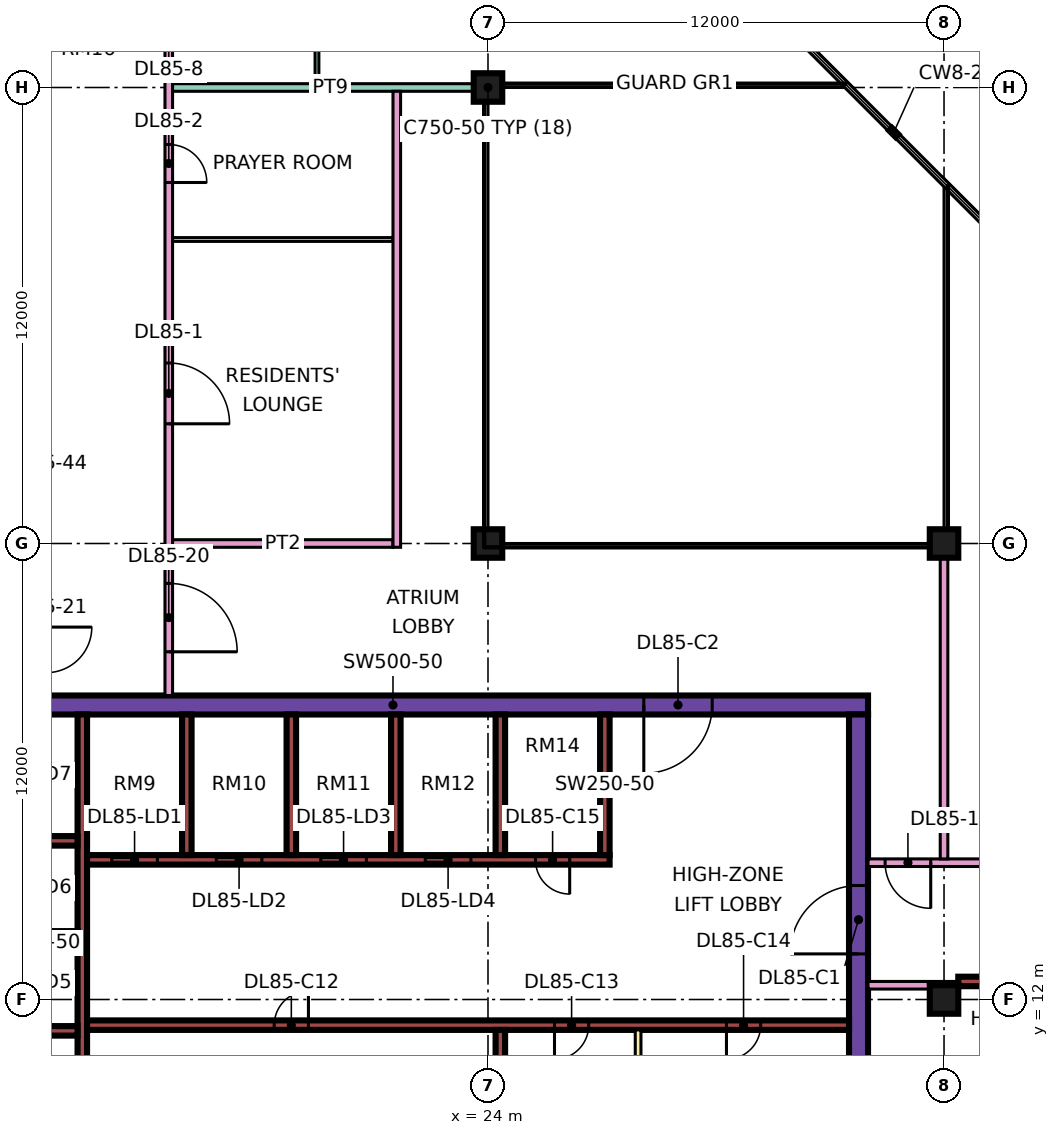
"""IFC4 building model, lengths in metres.
Left out: names, types, materials, properties, quantities, classifications, styles, units other than length and angle.
Written with IfcOpenShell. Run it as: python <this file> out.ifc"""

import sys

from ifc_helpers import new_model, si_unit, direction, frame, frame_2d, origin, origin_2d, place, context, subcontext, project, spatial, rectangle, extrude, element, fill, save


model = new_model("IFC4")
c1 = context("Model", 3, precision=1e-05, world=origin(), true_north=direction((0.0, 1.0)))
c2 = subcontext(c1, "Body", "Model", "MODEL_VIEW")
j1 = project(units=[si_unit("LENGTHUNIT", "METRE"), si_unit("PLANEANGLEUNIT", "RADIAN")], contexts=[c1])
p1 = place(None, origin())
s1 = spatial("IfcSite", under=j1, at=p1, CompositionType="ELEMENT")
p2 = place(p1, origin())
s2 = spatial("IfcBuilding", under=s1, at=p2, CompositionType="ELEMENT")
p3 = place(p2, frame((0.0, 0.0, 365.15)))
s3 = spatial("IfcBuildingStorey", under=s2, at=p3, CompositionType="ELEMENT", Elevation=365.15)
for number, where, z_axis, x_axis in (
    (1, (24.0, 24.0, 0.0), (0.0, 0.0, 1.0), (1.0, 0.0, 0.0)),
    (2, (24.0, 36.0, 0.0), (0.0, 0.0, 1.0), (1.0, 0.0, 0.0)),
    (3, (36.0, 12.0, 0.0), (0.0, 0.0, 1.0), (1.0, 0.0, 0.0)),
    (4, (36.0, 24.0, 0.0), (0.0, 0.0, 1.0), (1.0, 0.0, 0.0)),
):
    element("IfcColumn", number, at=place(p3, frame(where, z_axis=z_axis, x_axis=x_axis)), inside=s3, PredefinedType="COLUMN", context=c2, shape_type="SweptSolid", body=[
        extrude(rectangle(XDim=0.75, YDim=0.75, at=origin_2d()), origin(), (0.0, 0.0, 1.0), 3.75),
    ])
p4 = place(p3, frame((9.0, 19.75, 0.0), z_axis=(0.0, 0.0, 1.0), x_axis=(1.0, 0.0, 0.0)))
e5 = element("IfcWall", 5, at=p4, inside=s3, PredefinedType="SHEAR", context=c2, shape_type="SweptSolid", body=[
    extrude(rectangle(XDim=25.0, YDim=0.5, at=frame_2d((12.5, 0.0))), origin(), (0.0, 0.0, 1.0), 3.75),
])
p5 = place(p4, frame((19.1, 0.0, 0.0)))
e6 = element("IfcOpeningElement", 6, at=p5, cuts=e5, PredefinedType="OPENING", context=c2, shape_type="SweptSolid", body=[
    extrude(rectangle(XDim=1.8, YDim=2.4, at=frame_2d((0.9, 1.2))), frame((0.0, 0.26, 0.0), z_axis=(0.0, -1.0, 0.0), x_axis=(1.0, 0.0, 0.0)), (0.0, 0.0, 1.0), 0.52),
])
p6 = place(p3, frame((33.75, 7.5, 0.0), z_axis=(0.0, 0.0, 1.0), x_axis=(0.0, 1.0, 0.0)))
e7 = element("IfcWall", 7, at=p6, inside=s3, PredefinedType="SHEAR", context=c2, shape_type="SweptSolid", body=[
    extrude(rectangle(XDim=12.0, YDim=0.5, at=frame_2d((6.0, 0.0))), origin(), (0.0, 0.0, 1.0), 3.75),
])
p7 = place(p6, frame((5.7, 0.0, 0.0)))
e8 = element("IfcOpeningElement", 8, at=p7, cuts=e7, PredefinedType="OPENING", context=c2, shape_type="SweptSolid", body=[
    extrude(rectangle(XDim=1.8, YDim=2.4, at=frame_2d((0.9, 1.2))), frame((0.0, 0.26, 0.0), z_axis=(0.0, -1.0, 0.0), x_axis=(1.0, 0.0, 0.0)), (0.0, 0.0, 1.0), 0.52),
])
p8 = place(p3, frame((13.325, 7.5, 0.0), z_axis=(0.0, 0.0, 1.0), x_axis=(0.0, 1.0, 0.0)))
e9 = element("IfcWall", 9, at=p8, inside=s3, PredefinedType="SHEAR", context=c2, shape_type="SweptSolid", body=[
    extrude(rectangle(XDim=12.0, YDim=0.25, at=frame_2d((6.0, 0.0))), origin(), (0.0, 0.0, 1.0), 3.75),
])
p9 = place(p3, frame((13.45, 11.325, 0.0), z_axis=(0.0, 0.0, 1.0), x_axis=(1.0, 0.0, 0.0)))
e10 = element("IfcWall", 10, at=p9, inside=s3, PredefinedType="SHEAR", context=c2, shape_type="SweptSolid", body=[
    extrude(rectangle(XDim=20.05, YDim=0.25, at=frame_2d((10.025, 0.0))), origin(), (0.0, 0.0, 1.0), 3.75),
])
p10 = place(p9, frame((4.925, 0.0, 0.0)))
e11 = element("IfcOpeningElement", 11, at=p10, cuts=e10, PredefinedType="OPENING", context=c2, shape_type="SweptSolid", body=[
    extrude(rectangle(XDim=0.9, YDim=2.1, at=frame_2d((0.45, 1.05))), frame((0.0, 0.135, 0.0), z_axis=(0.0, -1.0, 0.0), x_axis=(1.0, 0.0, 0.0)), (0.0, 0.0, 1.0), 0.27),
])
p11 = place(p9, frame((12.3, 0.0, 0.0)))
e12 = element("IfcOpeningElement", 12, at=p11, cuts=e10, PredefinedType="OPENING", context=c2, shape_type="SweptSolid", body=[
    extrude(rectangle(XDim=0.9, YDim=2.1, at=frame_2d((0.45, 1.05))), frame((0.0, 0.135, 0.0), z_axis=(0.0, -1.0, 0.0), x_axis=(1.0, 0.0, 0.0)), (0.0, 0.0, 1.0), 0.27),
])
p12 = place(p9, frame((16.825, 0.0, 0.0)))
e13 = element("IfcOpeningElement", 13, at=p12, cuts=e10, PredefinedType="OPENING", context=c2, shape_type="SweptSolid", body=[
    extrude(rectangle(XDim=0.9, YDim=2.1, at=frame_2d((0.45, 1.05))), frame((0.0, 0.135, 0.0), z_axis=(0.0, -1.0, 0.0), x_axis=(1.0, 0.0, 0.0)), (0.0, 0.0, 1.0), 0.27),
])
p13 = place(p3, frame((13.45, 15.675, 0.0), z_axis=(0.0, 0.0, 1.0), x_axis=(1.0, 0.0, 0.0)))
e14 = element("IfcWall", 14, at=p13, inside=s3, PredefinedType="SHEAR", context=c2, shape_type="SweptSolid", body=[
    extrude(rectangle(XDim=13.75, YDim=0.25, at=frame_2d((6.875, 0.0))), origin(), (0.0, 0.0, 1.0), 3.75),
])
p14 = place(p13, frame((0.65, 0.0, 0.0)))
e15 = element("IfcOpeningElement", 15, at=p14, cuts=e14, PredefinedType="OPENING", context=c2, shape_type="SweptSolid", body=[
    extrude(rectangle(XDim=1.2, YDim=2.2, at=frame_2d((0.6, 1.1))), frame((0.0, 0.135, 0.0), z_axis=(0.0, -1.0, 0.0), x_axis=(1.0, 0.0, 0.0)), (0.0, 0.0, 1.0), 0.27),
])
p15 = place(p13, frame((3.4, 0.0, 0.0)))
e16 = element("IfcOpeningElement", 16, at=p15, cuts=e14, PredefinedType="OPENING", context=c2, shape_type="SweptSolid", body=[
    extrude(rectangle(XDim=1.2, YDim=2.2, at=frame_2d((0.6, 1.1))), frame((0.0, 0.135, 0.0), z_axis=(0.0, -1.0, 0.0), x_axis=(1.0, 0.0, 0.0)), (0.0, 0.0, 1.0), 0.27),
])
p16 = place(p13, frame((6.15, 0.0, 0.0)))
e17 = element("IfcOpeningElement", 17, at=p16, cuts=e14, PredefinedType="OPENING", context=c2, shape_type="SweptSolid", body=[
    extrude(rectangle(XDim=1.2, YDim=2.2, at=frame_2d((0.6, 1.1))), frame((0.0, 0.135, 0.0), z_axis=(0.0, -1.0, 0.0), x_axis=(1.0, 0.0, 0.0)), (0.0, 0.0, 1.0), 0.27),
])
p17 = place(p13, frame((8.9, 0.0, 0.0)))
e18 = element("IfcOpeningElement", 18, at=p17, cuts=e14, PredefinedType="OPENING", context=c2, shape_type="SweptSolid", body=[
    extrude(rectangle(XDim=1.2, YDim=2.2, at=frame_2d((0.6, 1.1))), frame((0.0, 0.135, 0.0), z_axis=(0.0, -1.0, 0.0), x_axis=(1.0, 0.0, 0.0)), (0.0, 0.0, 1.0), 0.27),
])
p18 = place(p13, frame((11.8, 0.0, 0.0)))
e19 = element("IfcOpeningElement", 19, at=p18, cuts=e14, PredefinedType="OPENING", context=c2, shape_type="SweptSolid", body=[
    extrude(rectangle(XDim=0.9, YDim=2.1, at=frame_2d((0.45, 1.05))), frame((0.0, 0.135, 0.0), z_axis=(0.0, -1.0, 0.0), x_axis=(1.0, 0.0, 0.0)), (0.0, 0.0, 1.0), 0.27),
])
for number, where, z_axis, x_axis in (
    (20, (10.2, 11.175, 0.0), (0.0, 0.0, 1.0), (1.0, 0.0, 0.0)),
    (21, (10.2, 13.675, 0.0), (0.0, 0.0, 1.0), (1.0, 0.0, 0.0)),
    (22, (10.2, 16.175, 0.0), (0.0, 0.0, 1.0), (1.0, 0.0, 0.0)),
):
    element("IfcWall", number, at=place(p3, frame(where, z_axis=z_axis, x_axis=x_axis)), inside=s3, PredefinedType="SHEAR", context=c2, shape_type="SweptSolid", body=[
        extrude(rectangle(XDim=3.0, YDim=0.25, at=frame_2d((1.5, 0.0))), origin(), (0.0, 0.0, 1.0), 3.75),
    ])
for number, where, z_axis, x_axis in (
    (23, (24.325, 7.5, 0.0), (0.0, 0.0, 1.0), (0.0, 1.0, 0.0)),
    (24, (16.075, 15.8, 0.0), (0.0, 0.0, 1.0), (0.0, 1.0, 0.0)),
    (25, (18.825, 15.8, 0.0), (0.0, 0.0, 1.0), (0.0, 1.0, 0.0)),
    (26, (21.575, 15.8, 0.0), (0.0, 0.0, 1.0), (0.0, 1.0, 0.0)),
    (27, (24.325, 15.8, 0.0), (0.0, 0.0, 1.0), (0.0, 1.0, 0.0)),
    (28, (27.075, 15.8, 0.0), (0.0, 0.0, 1.0), (0.0, 1.0, 0.0)),
):
    element("IfcWall", number, at=place(p3, frame(where, z_axis=z_axis, x_axis=x_axis)), inside=s3, PredefinedType="SHEAR", context=c2, shape_type="SweptSolid", body=[
        extrude(rectangle(XDim=3.7, YDim=0.25, at=frame_2d((1.85, 0.0))), origin(), (0.0, 0.0, 1.0), 3.75),
    ])
p19 = place(p3, frame((36.375, 12.475, 0.0), z_axis=(0.0, 0.0, 1.0), x_axis=(1.0, 0.0, 0.0)))
e29 = element("IfcWall", 29, at=p19, inside=s3, PredefinedType="SHEAR", context=c2, shape_type="SweptSolid", body=[
    extrude(rectangle(XDim=4.275, YDim=0.25, at=frame_2d((2.137, 0.0))), origin(), (0.0, 0.0, 1.0), 3.75),
])
p20 = place(p19, frame((2.0, 0.0, 0.0)))
e30 = element("IfcOpeningElement", 30, at=p20, cuts=e29, PredefinedType="OPENING", context=c2, shape_type="SweptSolid", body=[
    extrude(rectangle(XDim=1.1, YDim=2.2, at=frame_2d((0.55, 1.1))), frame((0.0, 0.135, 0.0), z_axis=(0.0, -1.0, 0.0), x_axis=(1.0, 0.0, 0.0)), (0.0, 0.0, 1.0), 0.27),
])
p21 = place(p3, frame((-1.447, 12.553, 0.0), z_axis=(0.0, 0.0, 1.0), x_axis=(0.707106781187, -0.707106781187, 0.0)))
e31 = element("IfcWall", 31, at=p21, inside=s3, PredefinedType="SOLIDWALL", context=c2, shape_type="SweptSolid", body=[
    extrude(rectangle(XDim=19.799, YDim=0.15, at=frame_2d((9.899, 0.0))), origin(), (0.0, 0.0, 1.0), 3.35),
])
p22 = place(p21, frame((2.212, 0.0, 0.45)))
e32 = element("IfcOpeningElement", 32, at=p22, cuts=e31, PredefinedType="OPENING", context=c2, shape_type="SweptSolid", body=[
    extrude(rectangle(XDim=3.0, YDim=2.4, at=frame_2d((1.5, 1.2))), frame((0.0, 0.085, 0.0), z_axis=(0.0, -1.0, 0.0), x_axis=(1.0, 0.0, 0.0)), (0.0, 0.0, 1.0), 0.17),
])
p23 = place(p21, frame((10.216, 0.0, 0.45)))
e33 = element("IfcOpeningElement", 33, at=p23, cuts=e31, PredefinedType="OPENING", context=c2, shape_type="SweptSolid", body=[
    extrude(rectangle(XDim=3.0, YDim=2.4, at=frame_2d((1.5, 1.2))), frame((0.0, 0.085, 0.0), z_axis=(0.0, -1.0, 0.0), x_axis=(1.0, 0.0, 0.0)), (0.0, 0.0, 1.0), 0.17),
])
p24 = place(p3, frame((27.95, 7.5, 0.0), z_axis=(0.0, 0.0, 1.0), x_axis=(0.0, 1.0, 0.0)))
e34 = element("IfcWall", 34, at=p24, inside=s3, PredefinedType="PARTITIONING", context=c2, shape_type="SweptSolid", body=[
    extrude(rectangle(XDim=3.7, YDim=0.15, at=frame_2d((1.85, 0.0))), origin(), (0.0, 0.0, 1.0), 3.35),
])
p25 = place(p3, frame((15.6, 20.0, 0.0), z_axis=(0.0, 0.0, 1.0), x_axis=(0.0, 1.0, 0.0)))
e35 = element("IfcWall", 35, at=p25, inside=s3, PredefinedType="PARTITIONING", context=c2, shape_type="SweptSolid", body=[
    extrude(rectangle(XDim=27.775, YDim=0.2, at=frame_2d((13.887, 0.0))), origin(), (0.0, 0.0, 1.0), 3.35),
])
p26 = place(p25, frame((7.15, 0.0, 0.0)))
e36 = element("IfcOpeningElement", 36, at=p26, cuts=e35, PredefinedType="OPENING", context=c2, shape_type="SweptSolid", body=[
    extrude(rectangle(XDim=1.6, YDim=2.1, at=frame_2d((0.8, 1.05))), frame((0.0, 0.11, 0.0), z_axis=(0.0, -1.0, 0.0), x_axis=(1.0, 0.0, 0.0)), (0.0, 0.0, 1.0), 0.22),
])
p27 = place(p25, frame((13.5, 0.0, 0.0)))
e37 = element("IfcOpeningElement", 37, at=p27, cuts=e35, PredefinedType="OPENING", context=c2, shape_type="SweptSolid", body=[
    extrude(rectangle(XDim=1.0, YDim=2.1, at=frame_2d((0.5, 1.05))), frame((0.0, 0.11, 0.0), z_axis=(0.0, -1.0, 0.0), x_axis=(1.0, 0.0, 0.0)), (0.0, 0.0, 1.0), 0.22),
])
p28 = place(p25, frame((17.05, 0.0, 0.0)))
e38 = element("IfcOpeningElement", 38, at=p28, cuts=e35, PredefinedType="OPENING", context=c2, shape_type="SweptSolid", body=[
    extrude(rectangle(XDim=1.0, YDim=2.1, at=frame_2d((0.5, 1.05))), frame((0.0, 0.11, 0.0), z_axis=(0.0, -1.0, 0.0), x_axis=(1.0, 0.0, 0.0)), (0.0, 0.0, 1.0), 0.22),
])
p29 = place(p25, frame((1.15, 0.0, 0.0)))
e39 = element("IfcOpeningElement", 39, at=p29, cuts=e35, PredefinedType="OPENING", context=c2, shape_type="SweptSolid", body=[
    extrude(rectangle(XDim=1.8, YDim=2.1, at=frame_2d((0.9, 1.05))), frame((0.0, 0.11, 0.0), z_axis=(0.0, -1.0, 0.0), x_axis=(1.0, 0.0, 0.0)), (0.0, 0.0, 1.0), 0.22),
])
p30 = place(p25, frame((25.9, 0.0, 0.0)))
e40 = element("IfcOpeningElement", 40, at=p30, cuts=e35, PredefinedType="OPENING", context=c2, shape_type="SweptSolid", body=[
    extrude(rectangle(XDim=1.0, YDim=2.1, at=frame_2d((0.5, 1.05))), frame((0.0, 0.11, 0.0), z_axis=(0.0, -1.0, 0.0), x_axis=(1.0, 0.0, 0.0)), (0.0, 0.0, 1.0), 0.22),
])
p31 = place(p3, frame((15.7, 24.0, 0.0), z_axis=(0.0, 0.0, 1.0), x_axis=(1.0, 0.0, 0.0)))
e41 = element("IfcWall", 41, at=p31, inside=s3, PredefinedType="PARTITIONING", context=c2, shape_type="SweptSolid", body=[
    extrude(rectangle(XDim=5.8, YDim=0.2, at=frame_2d((2.9, 0.0))), origin(), (0.0, 0.0, 1.0), 3.35),
])
p32 = place(p3, frame((15.7, 32.0, 0.0), z_axis=(0.0, 0.0, 1.0), x_axis=(1.0, 0.0, 0.0)))
e42 = element("IfcWall", 42, at=p32, inside=s3, PredefinedType="PARTITIONING", context=c2, shape_type="SweptSolid", body=[
    extrude(rectangle(XDim=5.8, YDim=0.1, at=frame_2d((2.9, 0.0))), origin(), (0.0, 0.0, 1.0), 3.35),
])
p33 = place(p3, frame((15.7, 36.0, 0.0), z_axis=(0.0, 0.0, 1.0), x_axis=(1.0, 0.0, 0.0)))
e43 = element("IfcWall", 43, at=p33, inside=s3, PredefinedType="PARTITIONING", context=c2, shape_type="SweptSolid", body=[
    extrude(rectangle(XDim=8.3, YDim=0.2, at=frame_2d((4.15, 0.0))), origin(), (0.0, 0.0, 1.0), 3.35),
])
p34 = place(p3, frame((19.5, 36.1, 0.0), z_axis=(0.0, 0.0, 1.0), x_axis=(0.0, 1.0, 0.0)))
e44 = element("IfcWall", 44, at=p34, inside=s3, PredefinedType="PARTITIONING", context=c2, shape_type="SweptSolid", body=[
    extrude(rectangle(XDim=2.85, YDim=0.1, at=frame_2d((1.425, 0.0))), origin(), (0.0, 0.0, 1.0), 3.35),
])
p35 = place(p34, frame((0.95, 0.0, 0.0)))
e45 = element("IfcOpeningElement", 45, at=p35, cuts=e44, PredefinedType="OPENING", context=c2, shape_type="SweptSolid", body=[
    extrude(rectangle(XDim=0.9, YDim=2.1, at=frame_2d((0.45, 1.05))), frame((0.0, 0.06, 0.0), z_axis=(0.0, -1.0, 0.0), x_axis=(1.0, 0.0, 0.0)), (0.0, 0.0, 1.0), 0.12),
])
p36 = place(p3, frame((21.6, 23.9, 0.0), z_axis=(0.0, 0.0, 1.0), x_axis=(0.0, 1.0, 0.0)))
e46 = element("IfcWall", 46, at=p36, inside=s3, PredefinedType="PARTITIONING", context=c2, shape_type="SweptSolid", body=[
    extrude(rectangle(XDim=12.0, YDim=0.2, at=frame_2d((6.0, 0.0))), origin(), (0.0, 0.0, 1.0), 3.35),
])
p37 = place(p3, frame((34.0, 12.375, 0.0), z_axis=(0.0, 0.0, 1.0), x_axis=(1.0, 0.0, 0.0)))
e47 = element("IfcWall", 47, at=p37, inside=s3, PredefinedType="PARTITIONING", context=c2, shape_type="SweptSolid", body=[
    extrude(rectangle(XDim=2.376, YDim=0.2, at=frame_2d((1.188, 0.0))), origin(), (0.0, 0.0, 1.0), 3.35),
])
p38 = place(p3, frame((34.0, 15.6, 0.0), z_axis=(0.0, 0.0, 1.0), x_axis=(1.0, 0.0, 0.0)))
e48 = element("IfcWall", 48, at=p38, inside=s3, PredefinedType="PARTITIONING", context=c2, shape_type="SweptSolid", body=[
    extrude(rectangle(XDim=10.35, YDim=0.2, at=frame_2d((5.175, 0.0))), origin(), (0.0, 0.0, 1.0), 3.35),
])
p39 = place(p38, frame((5.6, 0.0, 0.0)))
e49 = element("IfcOpeningElement", 49, at=p39, cuts=e48, PredefinedType="OPENING", context=c2, shape_type="SweptSolid", body=[
    extrude(rectangle(XDim=1.0, YDim=2.1, at=frame_2d((0.5, 1.05))), frame((0.0, 0.11, 0.0), z_axis=(0.0, -1.0, 0.0), x_axis=(1.0, 0.0, 0.0)), (0.0, 0.0, 1.0), 0.22),
])
p40 = place(p38, frame((0.45, 0.0, 0.0)))
e50 = element("IfcOpeningElement", 50, at=p40, cuts=e48, PredefinedType="OPENING", context=c2, shape_type="SweptSolid", body=[
    extrude(rectangle(XDim=1.2, YDim=2.1, at=frame_2d((0.6, 1.05))), frame((0.0, 0.11, 0.0), z_axis=(0.0, -1.0, 0.0), x_axis=(1.0, 0.0, 0.0)), (0.0, 0.0, 1.0), 0.22),
])
p41 = place(p3, frame((36.0, 15.7, 0.0), z_axis=(0.0, 0.0, 1.0), x_axis=(0.0, 1.0, 0.0)))
e51 = element("IfcWall", 51, at=p41, inside=s3, PredefinedType="PARTITIONING", context=c2, shape_type="SweptSolid", body=[
    extrude(rectangle(XDim=8.3, YDim=0.2, at=frame_2d((4.15, 0.0))), origin(), (0.0, 0.0, 1.0), 3.35),
])
p42 = place(p14, origin())
e52 = element("IfcDoor", 52, at=p42, inside=s3, OperationType="DOUBLE_DOOR_SLIDING", PredefinedType="DOOR", context=c2, shape_type="SweptSolid", body=[
    extrude(rectangle(XDim=1.2, YDim=2.2, at=frame_2d((0.6, 1.1))), frame((0.0, 0.025, 0.0), z_axis=(0.0, -1.0, 0.0), x_axis=(1.0, 0.0, 0.0)), (0.0, 0.0, 1.0), 0.05),
])
fill(e15, e52)
p43 = place(p15, origin())
e53 = element("IfcDoor", 53, at=p43, inside=s3, OperationType="DOUBLE_DOOR_SLIDING", PredefinedType="DOOR", context=c2, shape_type="SweptSolid", body=[
    extrude(rectangle(XDim=1.2, YDim=2.2, at=frame_2d((0.6, 1.1))), frame((0.0, 0.025, 0.0), z_axis=(0.0, -1.0, 0.0), x_axis=(1.0, 0.0, 0.0)), (0.0, 0.0, 1.0), 0.05),
])
fill(e16, e53)
p44 = place(p16, origin())
e54 = element("IfcDoor", 54, at=p44, inside=s3, OperationType="DOUBLE_DOOR_SLIDING", PredefinedType="DOOR", context=c2, shape_type="SweptSolid", body=[
    extrude(rectangle(XDim=1.2, YDim=2.2, at=frame_2d((0.6, 1.1))), frame((0.0, 0.025, 0.0), z_axis=(0.0, -1.0, 0.0), x_axis=(1.0, 0.0, 0.0)), (0.0, 0.0, 1.0), 0.05),
])
fill(e17, e54)
p45 = place(p17, origin())
e55 = element("IfcDoor", 55, at=p45, inside=s3, OperationType="DOUBLE_DOOR_SLIDING", PredefinedType="DOOR", context=c2, shape_type="SweptSolid", body=[
    extrude(rectangle(XDim=1.2, YDim=2.2, at=frame_2d((0.6, 1.1))), frame((0.0, 0.025, 0.0), z_axis=(0.0, -1.0, 0.0), x_axis=(1.0, 0.0, 0.0)), (0.0, 0.0, 1.0), 0.05),
])
fill(e18, e55)
p46 = place(p7, origin())
e56 = element("IfcDoor", 56, at=p46, inside=s3, OperationType="DOUBLE_DOOR_SINGLE_SWING", PredefinedType="DOOR", context=c2, shape_type="SweptSolid", body=[
    extrude(rectangle(XDim=1.8, YDim=2.4, at=frame_2d((0.9, 1.2))), frame((0.0, 0.025, 0.0), z_axis=(0.0, -1.0, 0.0), x_axis=(1.0, 0.0, 0.0)), (0.0, 0.0, 1.0), 0.05),
])
fill(e8, e56)
p47 = place(p5, frame((1.8, 0.0, 0.0), z_axis=(0.0, 0.0, 1.0), x_axis=(-1.0, 0.0, 0.0)))
e57 = element("IfcDoor", 57, at=p47, inside=s3, OperationType="DOUBLE_DOOR_SINGLE_SWING", PredefinedType="DOOR", context=c2, shape_type="SweptSolid", body=[
    extrude(rectangle(XDim=1.8, YDim=2.4, at=frame_2d((0.9, 1.2))), frame((0.0, 0.025, 0.0), z_axis=(0.0, -1.0, 0.0), x_axis=(1.0, 0.0, 0.0)), (0.0, 0.0, 1.0), 0.05),
])
fill(e6, e57)
p48 = place(p10, frame((0.9, 0.0, 0.0), z_axis=(0.0, 0.0, 1.0), x_axis=(-1.0, 0.0, 0.0)))
e58 = element("IfcDoor", 58, at=p48, inside=s3, OperationType="SINGLE_SWING_RIGHT", PredefinedType="DOOR", context=c2, shape_type="SweptSolid", body=[
    extrude(rectangle(XDim=0.9, YDim=2.1, at=frame_2d((0.45, 1.05))), frame((0.0, 0.025, 0.0), z_axis=(0.0, -1.0, 0.0), x_axis=(1.0, 0.0, 0.0)), (0.0, 0.0, 1.0), 0.05),
])
fill(e11, e58)
p49 = place(p11, frame((0.9, 0.0, 0.0), z_axis=(0.0, 0.0, 1.0), x_axis=(-1.0, 0.0, 0.0)))
e59 = element("IfcDoor", 59, at=p49, inside=s3, OperationType="SINGLE_SWING_LEFT", PredefinedType="DOOR", context=c2, shape_type="SweptSolid", body=[
    extrude(rectangle(XDim=0.9, YDim=2.1, at=frame_2d((0.45, 1.05))), frame((0.0, 0.025, 0.0), z_axis=(0.0, -1.0, 0.0), x_axis=(1.0, 0.0, 0.0)), (0.0, 0.0, 1.0), 0.05),
])
fill(e12, e59)
p50 = place(p12, frame((0.9, 0.0, 0.0), z_axis=(0.0, 0.0, 1.0), x_axis=(-1.0, 0.0, 0.0)))
e60 = element("IfcDoor", 60, at=p50, inside=s3, OperationType="SINGLE_SWING_LEFT", PredefinedType="DOOR", context=c2, shape_type="SweptSolid", body=[
    extrude(rectangle(XDim=0.9, YDim=2.1, at=frame_2d((0.45, 1.05))), frame((0.0, 0.025, 0.0), z_axis=(0.0, -1.0, 0.0), x_axis=(1.0, 0.0, 0.0)), (0.0, 0.0, 1.0), 0.05),
])
fill(e13, e60)
p51 = place(p18, origin())
e61 = element("IfcDoor", 61, at=p51, inside=s3, OperationType="SINGLE_SWING_RIGHT", PredefinedType="DOOR", context=c2, shape_type="SweptSolid", body=[
    extrude(rectangle(XDim=0.9, YDim=2.1, at=frame_2d((0.45, 1.05))), frame((0.0, 0.025, 0.0), z_axis=(0.0, -1.0, 0.0), x_axis=(1.0, 0.0, 0.0)), (0.0, 0.0, 1.0), 0.05),
])
fill(e19, e61)
p52 = place(p26, frame((1.6, 0.0, 0.0), z_axis=(0.0, 0.0, 1.0), x_axis=(-1.0, 0.0, 0.0)))
e62 = element("IfcDoor", 62, at=p52, inside=s3, OperationType="DOUBLE_DOOR_SINGLE_SWING", PredefinedType="DOOR", context=c2, shape_type="SweptSolid", body=[
    extrude(rectangle(XDim=1.6, YDim=2.1, at=frame_2d((0.8, 1.05))), frame((0.0, 0.025, 0.0), z_axis=(0.0, -1.0, 0.0), x_axis=(1.0, 0.0, 0.0)), (0.0, 0.0, 1.0), 0.05),
])
fill(e36, e62)
p53 = place(p27, frame((1.0, 0.0, 0.0), z_axis=(0.0, 0.0, 1.0), x_axis=(-1.0, 0.0, 0.0)))
e63 = element("IfcDoor", 63, at=p53, inside=s3, OperationType="SINGLE_SWING_LEFT", PredefinedType="DOOR", context=c2, shape_type="SweptSolid", body=[
    extrude(rectangle(XDim=1.0, YDim=2.1, at=frame_2d((0.5, 1.05))), frame((0.0, 0.025, 0.0), z_axis=(0.0, -1.0, 0.0), x_axis=(1.0, 0.0, 0.0)), (0.0, 0.0, 1.0), 0.05),
])
fill(e37, e63)
p54 = place(p40, origin())
e64 = element("IfcDoor", 64, at=p54, inside=s3, OperationType="SINGLE_SWING_RIGHT", PredefinedType="DOOR", context=c2, shape_type="SweptSolid", body=[
    extrude(rectangle(XDim=1.2, YDim=2.1, at=frame_2d((0.6, 1.05))), frame((0.0, 0.025, 0.0), z_axis=(0.0, -1.0, 0.0), x_axis=(1.0, 0.0, 0.0)), (0.0, 0.0, 1.0), 0.05),
])
fill(e50, e64)
p55 = place(p29, frame((1.8, 0.0, 0.0), z_axis=(0.0, 0.0, 1.0), x_axis=(-1.0, 0.0, 0.0)))
e65 = element("IfcDoor", 65, at=p55, inside=s3, OperationType="DOUBLE_DOOR_SINGLE_SWING", PredefinedType="DOOR", context=c2, shape_type="SweptSolid", body=[
    extrude(rectangle(XDim=1.8, YDim=2.1, at=frame_2d((0.9, 1.05))), frame((0.0, 0.025, 0.0), z_axis=(0.0, -1.0, 0.0), x_axis=(1.0, 0.0, 0.0)), (0.0, 0.0, 1.0), 0.05),
])
fill(e39, e65)
save(model, sys.argv[1])
